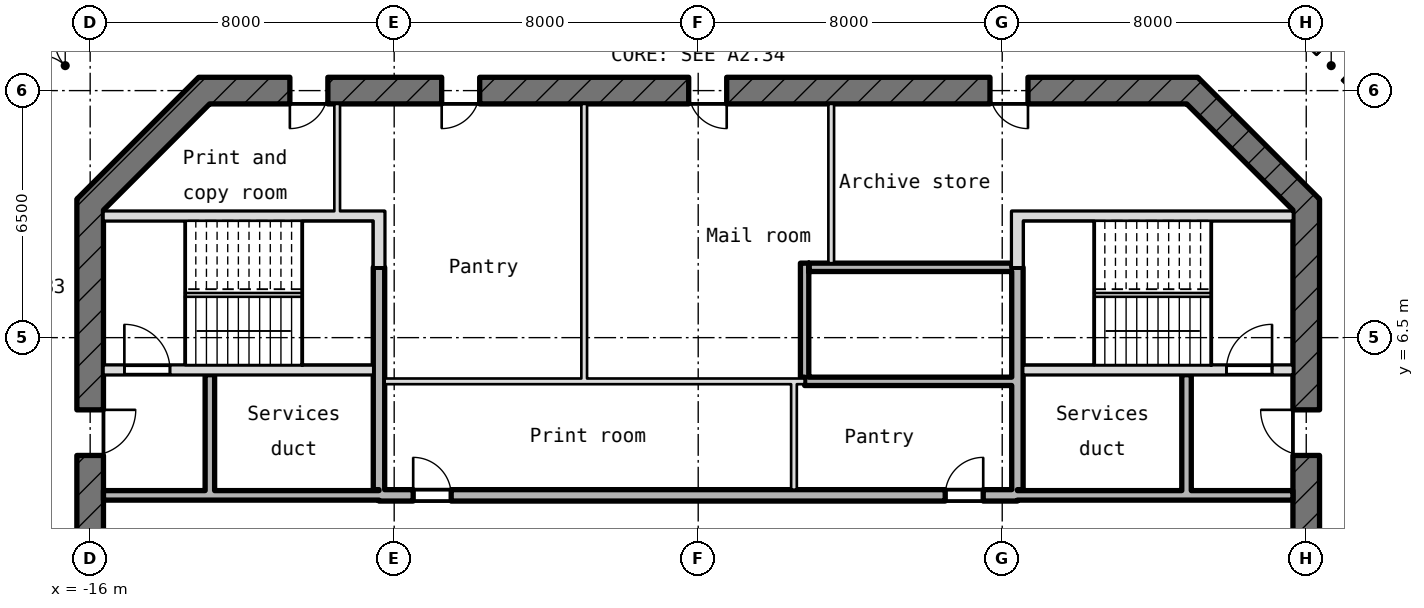
"""IFC4 building model, lengths in metres.
Left out: names, types, materials, properties, quantities, classifications, styles, units other than length and angle.
Written with IfcOpenShell. Run it as: python <this file> out.ifc"""

import sys

from ifc_helpers import new_model, si_unit, direction, frame, frame_2d, origin, place, context, subcontext, project, spatial, rectangle, extrude, element, fill, save


model = new_model("IFC4")
c1 = context("Model", 3, precision=1e-05, world=origin(), true_north=direction((0.0, 1.0)))
c2 = subcontext(c1, "Body", "Model", "MODEL_VIEW")
j1 = project(units=[si_unit("LENGTHUNIT", "METRE"), si_unit("PLANEANGLEUNIT", "RADIAN")], contexts=[c1])
p1 = place(None, origin())
s1 = spatial("IfcSite", under=j1, at=p1, CompositionType="ELEMENT")
p2 = place(p1, origin())
s2 = spatial("IfcBuilding", under=s1, at=p2, CompositionType="ELEMENT")
p3 = place(p2, frame((0.0, 0.0, 371.65)))
s3 = spatial("IfcBuildingStorey", under=s2, at=p3, CompositionType="ELEMENT", Elevation=371.65)
p4 = place(p3, frame((16.0, -10.145, -0.18), z_axis=(0.0, 0.0, 1.0), x_axis=(0.0, 1.0, 0.0)))
e1 = element("IfcWall", 1, at=p4, inside=s3, PredefinedType="SHEAR", context=c2, shape_type="SweptSolid", body=[
    extrude(rectangle(XDim=20.29, YDim=0.7, at=frame_2d((10.145, 0.0))), origin(), (0.0, 0.0, 1.0), 4.15),
])
p5 = place(p4, frame((8.945, 0.0, 0.18)))
e2 = element("IfcOpeningElement", 2, at=p5, cuts=e1, PredefinedType="OPENING", context=c2, shape_type="SweptSolid", body=[
    extrude(rectangle(XDim=2.4, YDim=2.1, at=frame_2d((1.2, 1.05))), frame((0.0, 0.36, 0.0), z_axis=(0.0, -1.0, 0.0), x_axis=(1.0, 0.0, 0.0)), (0.0, 0.0, 1.0), 0.72),
])
p6 = place(p4, frame((13.545, 0.0, 0.18)))
e3 = element("IfcOpeningElement", 3, at=p6, cuts=e1, PredefinedType="OPENING", context=c2, shape_type="SweptSolid", body=[
    extrude(rectangle(XDim=1.2, YDim=2.1, at=frame_2d((0.6, 1.05))), frame((0.0, 0.36, 0.0), z_axis=(0.0, -1.0, 0.0), x_axis=(1.0, 0.0, 0.0)), (0.0, 0.0, 1.0), 0.72),
])
p7 = place(p4, frame((3.545, 0.0, 0.18)))
e4 = element("IfcOpeningElement", 4, at=p7, cuts=e1, PredefinedType="OPENING", context=c2, shape_type="SweptSolid", body=[
    extrude(rectangle(XDim=1.2, YDim=2.1, at=frame_2d((0.6, 1.05))), frame((0.0, 0.36, 0.0), z_axis=(0.0, -1.0, 0.0), x_axis=(1.0, 0.0, 0.0)), (0.0, 0.0, 1.0), 0.72),
])
p8 = place(p3, frame((16.103, 9.897, -0.18), z_axis=(0.0, 0.0, 1.0), x_axis=(-0.707106781187, 0.707106781187, 0.0)))
e5 = element("IfcWall", 5, at=p8, inside=s3, PredefinedType="SHEAR", context=c2, shape_type="SweptSolid", body=[
    extrude(rectangle(XDim=4.533, YDim=0.7, at=frame_2d((2.266, 0.0))), origin(), (0.0, 0.0, 1.0), 4.15),
])
p9 = place(p3, frame((13.145, 13.0, -0.18), z_axis=(0.0, 0.0, 1.0), x_axis=(-1.0, 0.0, 0.0)))
e6 = element("IfcWall", 6, at=p9, inside=s3, PredefinedType="SHEAR", context=c2, shape_type="SweptSolid", body=[
    extrude(rectangle(XDim=26.29, YDim=0.7, at=frame_2d((13.145, 0.0))), origin(), (0.0, 0.0, 1.0), 4.15),
])
p10 = place(p9, frame((22.89, 0.0, 0.18)))
e7 = element("IfcOpeningElement", 7, at=p10, cuts=e6, PredefinedType="OPENING", context=c2, shape_type="SweptSolid", body=[
    extrude(rectangle(XDim=1.0, YDim=2.1, at=frame_2d((0.5, 1.05))), frame((0.0, 0.36, 0.0), z_axis=(0.0, -1.0, 0.0), x_axis=(1.0, 0.0, 0.0)), (0.0, 0.0, 1.0), 0.72),
])
p11 = place(p9, frame((18.895, 0.0, 0.18)))
e8 = element("IfcOpeningElement", 8, at=p11, cuts=e6, PredefinedType="OPENING", context=c2, shape_type="SweptSolid", body=[
    extrude(rectangle(XDim=1.0, YDim=2.1, at=frame_2d((0.5, 1.05))), frame((0.0, 0.36, 0.0), z_axis=(0.0, -1.0, 0.0), x_axis=(1.0, 0.0, 0.0)), (0.0, 0.0, 1.0), 0.72),
])
p12 = place(p9, frame((12.395, 0.0, 0.18)))
e9 = element("IfcOpeningElement", 9, at=p12, cuts=e6, PredefinedType="OPENING", context=c2, shape_type="SweptSolid", body=[
    extrude(rectangle(XDim=1.0, YDim=2.1, at=frame_2d((0.5, 1.05))), frame((0.0, 0.36, 0.0), z_axis=(0.0, -1.0, 0.0), x_axis=(1.0, 0.0, 0.0)), (0.0, 0.0, 1.0), 0.72),
])
p13 = place(p9, frame((4.467, 0.0, 0.18)))
e10 = element("IfcOpeningElement", 10, at=p13, cuts=e6, PredefinedType="OPENING", context=c2, shape_type="SweptSolid", body=[
    extrude(rectangle(XDim=1.0, YDim=2.1, at=frame_2d((0.5, 1.05))), frame((0.0, 0.36, 0.0), z_axis=(0.0, -1.0, 0.0), x_axis=(1.0, 0.0, 0.0)), (0.0, 0.0, 1.0), 0.72),
])
p14 = place(p3, frame((-12.897, 13.103, -0.18), z_axis=(0.0, 0.0, 1.0), x_axis=(-0.707106781187, -0.707106781187, 0.0)))
e11 = element("IfcWall", 11, at=p14, inside=s3, PredefinedType="SHEAR", context=c2, shape_type="SweptSolid", body=[
    extrude(rectangle(XDim=4.533, YDim=0.7, at=frame_2d((2.266, 0.0))), origin(), (0.0, 0.0, 1.0), 4.15),
])
p15 = place(p3, frame((-16.0, 10.145, -0.18), z_axis=(0.0, 0.0, 1.0), x_axis=(0.0, -1.0, 0.0)))
e12 = element("IfcWall", 12, at=p15, inside=s3, PredefinedType="SHEAR", context=c2, shape_type="SweptSolid", body=[
    extrude(rectangle(XDim=20.29, YDim=0.7, at=frame_2d((10.145, 0.0))), origin(), (0.0, 0.0, 1.0), 4.15),
])
p16 = place(p15, frame((8.945, 0.0, 0.18)))
e13 = element("IfcOpeningElement", 13, at=p16, cuts=e12, PredefinedType="OPENING", context=c2, shape_type="SweptSolid", body=[
    extrude(rectangle(XDim=2.4, YDim=2.1, at=frame_2d((1.2, 1.05))), frame((0.0, 0.36, 0.0), z_axis=(0.0, -1.0, 0.0), x_axis=(1.0, 0.0, 0.0)), (0.0, 0.0, 1.0), 0.72),
])
p17 = place(p15, frame((5.545, 0.0, 0.18)))
e14 = element("IfcOpeningElement", 14, at=p17, cuts=e12, PredefinedType="OPENING", context=c2, shape_type="SweptSolid", body=[
    extrude(rectangle(XDim=1.2, YDim=2.1, at=frame_2d((0.6, 1.05))), frame((0.0, 0.36, 0.0), z_axis=(0.0, -1.0, 0.0), x_axis=(1.0, 0.0, 0.0)), (0.0, 0.0, 1.0), 0.72),
])
p18 = place(p3, frame((-15.65, 2.35, 0.0), z_axis=(0.0, 0.0, 1.0), x_axis=(1.0, 0.0, 0.0)))
e15 = element("IfcWall", 15, at=p18, inside=s3, PredefinedType="STANDARD", context=c2, shape_type="SweptSolid", body=[
    extrude(rectangle(XDim=7.25, YDim=0.25, at=frame_2d((3.625, 0.0))), origin(), (0.0, 0.0, 1.0), 3.97),
])
p19 = place(p3, frame((-8.4, 2.35, -0.18), z_axis=(0.0, 0.0, 1.0), x_axis=(1.0, 0.0, 0.0)))
e16 = element("IfcWall", 16, at=p19, inside=s3, PredefinedType="SHEAR", context=c2, shape_type="SweptSolid", body=[
    extrude(rectangle(XDim=16.8, YDim=0.3, at=frame_2d((8.4, 0.0))), origin(), (0.0, 0.0, 1.0), 4.15),
])
p20 = place(p19, frame((0.9, 0.0, 0.18)))
e17 = element("IfcOpeningElement", 17, at=p20, cuts=e16, PredefinedType="OPENING", context=c2, shape_type="SweptSolid", body=[
    extrude(rectangle(XDim=1.0, YDim=2.1, at=frame_2d((0.5, 1.05))), frame((0.0, 0.16, 0.0), z_axis=(0.0, -1.0, 0.0), x_axis=(1.0, 0.0, 0.0)), (0.0, 0.0, 1.0), 0.32),
])
p21 = place(p19, frame((14.9, 0.0, 0.18)))
e18 = element("IfcOpeningElement", 18, at=p21, cuts=e16, PredefinedType="OPENING", context=c2, shape_type="SweptSolid", body=[
    extrude(rectangle(XDim=1.0, YDim=2.1, at=frame_2d((0.5, 1.05))), frame((0.0, 0.16, 0.0), z_axis=(0.0, -1.0, 0.0), x_axis=(1.0, 0.0, 0.0)), (0.0, 0.0, 1.0), 0.32),
])
p22 = place(p3, frame((8.4, 2.35, 0.0), z_axis=(0.0, 0.0, 1.0), x_axis=(1.0, 0.0, 0.0)))
e19 = element("IfcWall", 19, at=p22, inside=s3, PredefinedType="STANDARD", context=c2, shape_type="SweptSolid", body=[
    extrude(rectangle(XDim=7.25, YDim=0.25, at=frame_2d((3.625, 0.0))), origin(), (0.0, 0.0, 1.0), 3.97),
])
p23 = place(p3, frame((-8.25, 5.35, 0.0), z_axis=(0.0, 0.0, 1.0), x_axis=(1.0, 0.0, 0.0)))
e20 = element("IfcWall", 20, at=p23, inside=s3, PredefinedType="PARTITIONING", context=c2, shape_type="SweptSolid", body=[
    extrude(rectangle(XDim=11.05, YDim=0.15, at=frame_2d((5.525, 0.0))), origin(), (0.0, 0.0, 1.0), 3.97),
])
p24 = place(p3, frame((2.8, 5.35, 0.0), z_axis=(0.0, 0.0, 1.0), x_axis=(1.0, 0.0, 0.0)))
e21 = element("IfcWall", 21, at=p24, inside=s3, PredefinedType="STANDARD", context=c2, shape_type="SweptSolid", body=[
    extrude(rectangle(XDim=5.45, YDim=0.22, at=frame_2d((2.725, 0.0))), origin(), (0.0, 0.0, 1.0), 3.97),
])
p25 = place(p3, frame((-15.65, 5.65, -0.18), z_axis=(0.0, 0.0, 1.0), x_axis=(1.0, 0.0, 0.0)))
e22 = element("IfcWall", 22, at=p25, inside=s3, PredefinedType="SHEAR", context=c2, shape_type="SweptSolid", body=[
    extrude(rectangle(XDim=7.1, YDim=0.25, at=frame_2d((3.55, 0.0))), origin(), (0.0, 0.0, 1.0), 4.15),
])
p26 = place(p25, frame((0.55, 0.0, 0.18)))
e23 = element("IfcOpeningElement", 23, at=p26, cuts=e22, PredefinedType="OPENING", context=c2, shape_type="SweptSolid", body=[
    extrude(rectangle(XDim=1.2, YDim=2.1, at=frame_2d((0.6, 1.05))), frame((0.0, 0.135, 0.0), z_axis=(0.0, -1.0, 0.0), x_axis=(1.0, 0.0, 0.0)), (0.0, 0.0, 1.0), 0.27),
])
p27 = place(p3, frame((8.55, 5.65, -0.18), z_axis=(0.0, 0.0, 1.0), x_axis=(1.0, 0.0, 0.0)))
e24 = element("IfcWall", 24, at=p27, inside=s3, PredefinedType="SHEAR", context=c2, shape_type="SweptSolid", body=[
    extrude(rectangle(XDim=7.1, YDim=0.25, at=frame_2d((3.55, 0.0))), origin(), (0.0, 0.0, 1.0), 4.15),
])
p28 = place(p27, frame((5.35, 0.0, 0.18)))
e25 = element("IfcOpeningElement", 25, at=p28, cuts=e24, PredefinedType="OPENING", context=c2, shape_type="SweptSolid", body=[
    extrude(rectangle(XDim=1.2, YDim=2.1, at=frame_2d((0.6, 1.05))), frame((0.0, 0.135, 0.0), z_axis=(0.0, -1.0, 0.0), x_axis=(1.0, 0.0, 0.0)), (0.0, 0.0, 1.0), 0.27),
])
p29 = place(p3, frame((2.91, 8.35, 0.0), z_axis=(0.0, 0.0, 1.0), x_axis=(1.0, 0.0, 0.0)))
e26 = element("IfcWall", 26, at=p29, inside=s3, PredefinedType="STANDARD", context=c2, shape_type="SweptSolid", body=[
    extrude(rectangle(XDim=5.34, YDim=0.22, at=frame_2d((2.67, 0.0))), origin(), (0.0, 0.0, 1.0), 3.97),
])
for number, where, z_axis, x_axis in (
    (27, (-15.65, 9.7, -0.18), (0.0, 0.0, 1.0), (1.0, 0.0, 0.0)),
    (28, (8.55, 9.7, -0.18), (0.0, 0.0, 1.0), (1.0, 0.0, 0.0)),
):
    element("IfcWall", number, at=place(p3, frame(where, z_axis=z_axis, x_axis=x_axis)), inside=s3, PredefinedType="SHEAR", context=c2, shape_type="SweptSolid", body=[
        extrude(rectangle(XDim=7.1, YDim=0.25, at=frame_2d((3.55, 0.0))), origin(), (0.0, 0.0, 1.0), 4.15),
    ])
p30 = place(p3, frame((-12.85, 2.475, 0.0), z_axis=(0.0, 0.0, 1.0), x_axis=(0.0, 1.0, 0.0)))
e29 = element("IfcWall", 29, at=p30, inside=s3, PredefinedType="STANDARD", context=c2, shape_type="SweptSolid", body=[
    extrude(rectangle(XDim=3.05, YDim=0.25, at=frame_2d((1.525, 0.0))), origin(), (0.0, 0.0, 1.0), 3.97),
])
p31 = place(p3, frame((-9.5, 9.825, 0.0), z_axis=(0.0, 0.0, 1.0), x_axis=(0.0, 1.0, 0.0)))
e30 = element("IfcWall", 30, at=p31, inside=s3, PredefinedType="PARTITIONING", context=c2, shape_type="SweptSolid", body=[
    extrude(rectangle(XDim=2.825, YDim=0.15, at=frame_2d((1.413, 0.0))), origin(), (0.0, 0.0, 1.0), 3.97),
])
p32 = place(p3, frame((-8.4, 2.5, -0.18), z_axis=(0.0, 0.0, 1.0), x_axis=(0.0, 1.0, 0.0)))
e31 = element("IfcWall", 31, at=p32, inside=s3, PredefinedType="SHEAR", context=c2, shape_type="SweptSolid", body=[
    extrude(rectangle(XDim=5.85, YDim=0.3, at=frame_2d((2.925, 0.0))), origin(), (0.0, 0.0, 1.0), 4.15),
])
p33 = place(p3, frame((-8.4, 8.35, -0.18), z_axis=(0.0, 0.0, 1.0), x_axis=(0.0, 1.0, 0.0)))
e32 = element("IfcWall", 32, at=p33, inside=s3, PredefinedType="SHEAR", context=c2, shape_type="SweptSolid", body=[
    extrude(rectangle(XDim=1.475, YDim=0.3, at=frame_2d((0.737, 0.0))), origin(), (0.0, 0.0, 1.0), 4.15),
])
p34 = place(p3, frame((-3.0, 5.425, 0.0), z_axis=(0.0, 0.0, 1.0), x_axis=(0.0, 1.0, 0.0)))
e33 = element("IfcWall", 33, at=p34, inside=s3, PredefinedType="PARTITIONING", context=c2, shape_type="SweptSolid", body=[
    extrude(rectangle(XDim=7.225, YDim=0.15, at=frame_2d((3.612, 0.0))), origin(), (0.0, 0.0, 1.0), 3.97),
])
p35 = place(p3, frame((2.52, 2.5, 0.0), z_axis=(0.0, 0.0, 1.0), x_axis=(0.0, 1.0, 0.0)))
e34 = element("IfcWall", 34, at=p35, inside=s3, PredefinedType="PARTITIONING", context=c2, shape_type="SweptSolid", body=[
    extrude(rectangle(XDim=2.775, YDim=0.15, at=frame_2d((1.387, 0.0))), origin(), (0.0, 0.0, 1.0), 3.97),
])
p36 = place(p3, frame((2.8, 5.46, 0.0), z_axis=(0.0, 0.0, 1.0), x_axis=(0.0, 1.0, 0.0)))
e35 = element("IfcWall", 35, at=p36, inside=s3, PredefinedType="STANDARD", context=c2, shape_type="SweptSolid", body=[
    extrude(rectangle(XDim=3.0, YDim=0.22, at=frame_2d((1.5, 0.0))), origin(), (0.0, 0.0, 1.0), 3.97),
])
p37 = place(p3, frame((3.5, 8.46, 0.0), z_axis=(0.0, 0.0, 1.0), x_axis=(0.0, 1.0, 0.0)))
e36 = element("IfcWall", 36, at=p37, inside=s3, PredefinedType="PARTITIONING", context=c2, shape_type="SweptSolid", body=[
    extrude(rectangle(XDim=4.19, YDim=0.15, at=frame_2d((2.095, 0.0))), origin(), (0.0, 0.0, 1.0), 3.97),
])
p38 = place(p3, frame((8.4, 2.5, -0.18), z_axis=(0.0, 0.0, 1.0), x_axis=(0.0, 1.0, 0.0)))
e37 = element("IfcWall", 37, at=p38, inside=s3, PredefinedType="SHEAR", context=c2, shape_type="SweptSolid", body=[
    extrude(rectangle(XDim=5.85, YDim=0.3, at=frame_2d((2.925, 0.0))), origin(), (0.0, 0.0, 1.0), 4.15),
])
p39 = place(p3, frame((8.4, 8.35, -0.18), z_axis=(0.0, 0.0, 1.0), x_axis=(0.0, 1.0, 0.0)))
e38 = element("IfcWall", 38, at=p39, inside=s3, PredefinedType="SHEAR", context=c2, shape_type="SweptSolid", body=[
    extrude(rectangle(XDim=1.475, YDim=0.3, at=frame_2d((0.737, 0.0))), origin(), (0.0, 0.0, 1.0), 4.15),
])
p40 = place(p3, frame((12.85, 2.475, 0.0), z_axis=(0.0, 0.0, 1.0), x_axis=(0.0, 1.0, 0.0)))
e39 = element("IfcWall", 39, at=p40, inside=s3, PredefinedType="STANDARD", context=c2, shape_type="SweptSolid", body=[
    extrude(rectangle(XDim=3.05, YDim=0.25, at=frame_2d((1.525, 0.0))), origin(), (0.0, 0.0, 1.0), 3.97),
])
p41 = place(p3, frame((-19.05, 11.263, 0.0), z_axis=(0.0, 0.0, 1.0), x_axis=(0.707106781187, 0.707106781187, 0.0)))
e40 = element("IfcWall", 40, at=p41, inside=s3, PredefinedType="PARTITIONING", context=c2, shape_type="SweptSolid", body=[
    extrude(rectangle(XDim=6.769, YDim=0.15, at=frame_2d((3.385, 0.0))), origin(), (0.0, 0.0, 1.0), 3.97),
])
p42 = place(p41, frame((2.485, 0.0, 0.0)))
e41 = element("IfcOpeningElement", 41, at=p42, cuts=e40, PredefinedType="OPENING", context=c2, shape_type="SweptSolid", body=[
    extrude(rectangle(XDim=1.8, YDim=2.1, at=frame_2d((0.9, 1.05))), frame((0.0, 0.085, 0.0), z_axis=(0.0, -1.0, 0.0), x_axis=(1.0, 0.0, 0.0)), (0.0, 0.0, 1.0), 0.17),
])
p43 = place(p3, frame((14.263, 16.05, 0.0), z_axis=(0.0, 0.0, 1.0), x_axis=(0.707106781187, -0.707106781187, 0.0)))
e42 = element("IfcWall", 42, at=p43, inside=s3, PredefinedType="PARTITIONING", context=c2, shape_type="SweptSolid", body=[
    extrude(rectangle(XDim=6.769, YDim=0.15, at=frame_2d((3.385, 0.0))), origin(), (0.0, 0.0, 1.0), 3.97),
])
p44 = place(p43, frame((2.91, 0.0, 0.0)))
e43 = element("IfcOpeningElement", 43, at=p44, cuts=e42, PredefinedType="OPENING", context=c2, shape_type="SweptSolid", body=[
    extrude(rectangle(XDim=0.95, YDim=2.1, at=frame_2d((0.475, 1.05))), frame((0.0, 0.085, 0.0), z_axis=(0.0, -1.0, 0.0), x_axis=(1.0, 0.0, 0.0)), (0.0, 0.0, 1.0), 0.17),
])
p45 = place(p26, origin())
e44 = element("IfcDoor", 44, at=p45, inside=s3, OperationType="SINGLE_SWING_RIGHT", PredefinedType="DOOR", context=c2, shape_type="SweptSolid", body=[
    extrude(rectangle(XDim=1.2, YDim=2.1, at=frame_2d((0.6, 1.05))), frame((0.0, 0.025, 0.0), z_axis=(0.0, -1.0, 0.0), x_axis=(1.0, 0.0, 0.0)), (0.0, 0.0, 1.0), 0.05),
])
fill(e23, e44)
p46 = place(p28, origin())
e45 = element("IfcDoor", 45, at=p46, inside=s3, OperationType="SINGLE_SWING_RIGHT", PredefinedType="DOOR", context=c2, shape_type="SweptSolid", body=[
    extrude(rectangle(XDim=1.2, YDim=2.1, at=frame_2d((0.6, 1.05))), frame((0.0, 0.025, 0.0), z_axis=(0.0, -1.0, 0.0), x_axis=(1.0, 0.0, 0.0)), (0.0, 0.0, 1.0), 0.05),
])
fill(e25, e45)
p47 = place(p17, origin())
e46 = element("IfcDoor", 46, at=p47, inside=s3, OperationType="SINGLE_SWING_RIGHT", PredefinedType="DOOR", context=c2, shape_type="SweptSolid", body=[
    extrude(rectangle(XDim=1.2, YDim=2.1, at=frame_2d((0.6, 1.05))), frame((0.0, 0.025, 0.0), z_axis=(0.0, -1.0, 0.0), x_axis=(1.0, 0.0, 0.0)), (0.0, 0.0, 1.0), 0.05),
])
fill(e14, e46)
p48 = place(p6, origin())
e47 = element("IfcDoor", 47, at=p48, inside=s3, OperationType="SINGLE_SWING_RIGHT", PredefinedType="DOOR", context=c2, shape_type="SweptSolid", body=[
    extrude(rectangle(XDim=1.2, YDim=2.1, at=frame_2d((0.6, 1.05))), frame((0.0, 0.025, 0.0), z_axis=(0.0, -1.0, 0.0), x_axis=(1.0, 0.0, 0.0)), (0.0, 0.0, 1.0), 0.05),
])
fill(e3, e47)
p49 = place(p20, origin())
e48 = element("IfcDoor", 48, at=p49, inside=s3, OperationType="SINGLE_SWING_RIGHT", PredefinedType="DOOR", context=c2, shape_type="SweptSolid", body=[
    extrude(rectangle(XDim=1.0, YDim=2.1, at=frame_2d((0.5, 1.05))), frame((0.0, 0.025, 0.0), z_axis=(0.0, -1.0, 0.0), x_axis=(1.0, 0.0, 0.0)), (0.0, 0.0, 1.0), 0.05),
])
fill(e17, e48)
p50 = place(p21, origin())
e49 = element("IfcDoor", 49, at=p50, inside=s3, OperationType="SINGLE_SWING_RIGHT", PredefinedType="DOOR", context=c2, shape_type="SweptSolid", body=[
    extrude(rectangle(XDim=1.0, YDim=2.1, at=frame_2d((0.5, 1.05))), frame((0.0, 0.025, 0.0), z_axis=(0.0, -1.0, 0.0), x_axis=(1.0, 0.0, 0.0)), (0.0, 0.0, 1.0), 0.05),
])
fill(e18, e49)
p51 = place(p10, origin())
e50 = element("IfcDoor", 50, at=p51, inside=s3, OperationType="SINGLE_SWING_RIGHT", PredefinedType="DOOR", context=c2, shape_type="SweptSolid", body=[
    extrude(rectangle(XDim=1.0, YDim=2.1, at=frame_2d((0.5, 1.05))), frame((0.0, 0.025, 0.0), z_axis=(0.0, -1.0, 0.0), x_axis=(1.0, 0.0, 0.0)), (0.0, 0.0, 1.0), 0.05),
])
fill(e7, e50)
p52 = place(p11, origin())
e51 = element("IfcDoor", 51, at=p52, inside=s3, OperationType="SINGLE_SWING_RIGHT", PredefinedType="DOOR", context=c2, shape_type="SweptSolid", body=[
    extrude(rectangle(XDim=1.0, YDim=2.1, at=frame_2d((0.5, 1.05))), frame((0.0, 0.025, 0.0), z_axis=(0.0, -1.0, 0.0), x_axis=(1.0, 0.0, 0.0)), (0.0, 0.0, 1.0), 0.05),
])
fill(e8, e51)
p53 = place(p12, origin())
e52 = element("IfcDoor", 52, at=p53, inside=s3, OperationType="SINGLE_SWING_RIGHT", PredefinedType="DOOR", context=c2, shape_type="SweptSolid", body=[
    extrude(rectangle(XDim=1.0, YDim=2.1, at=frame_2d((0.5, 1.05))), frame((0.0, 0.025, 0.0), z_axis=(0.0, -1.0, 0.0), x_axis=(1.0, 0.0, 0.0)), (0.0, 0.0, 1.0), 0.05),
])
fill(e9, e52)
p54 = place(p13, origin())
e53 = element("IfcDoor", 53, at=p54, inside=s3, OperationType="SINGLE_SWING_RIGHT", PredefinedType="DOOR", context=c2, shape_type="SweptSolid", body=[
    extrude(rectangle(XDim=1.0, YDim=2.1, at=frame_2d((0.5, 1.05))), frame((0.0, 0.025, 0.0), z_axis=(0.0, -1.0, 0.0), x_axis=(1.0, 0.0, 0.0)), (0.0, 0.0, 1.0), 0.05),
])
fill(e10, e53)
p55 = place(p44, origin())
e54 = element("IfcDoor", 54, at=p55, inside=s3, OperationType="SINGLE_SWING_RIGHT", PredefinedType="DOOR", context=c2, shape_type="SweptSolid", body=[
    extrude(rectangle(XDim=0.95, YDim=2.1, at=frame_2d((0.475, 1.05))), frame((0.0, 0.025, 0.0), z_axis=(0.0, -1.0, 0.0), x_axis=(1.0, 0.0, 0.0)), (0.0, 0.0, 1.0), 0.05),
])
fill(e43, e54)
p56 = place(p42, origin())
e55 = element("IfcDoor", 55, at=p56, inside=s3, OperationType="DOUBLE_DOOR_SINGLE_SWING", PredefinedType="DOOR", context=c2, shape_type="SweptSolid", body=[
    extrude(rectangle(XDim=1.8, YDim=2.1, at=frame_2d((0.9, 1.05))), frame((0.0, 0.025, 0.0), z_axis=(0.0, -1.0, 0.0), x_axis=(1.0, 0.0, 0.0)), (0.0, 0.0, 1.0), 0.05),
])
fill(e41, e55)
save(model, sys.argv[1])
